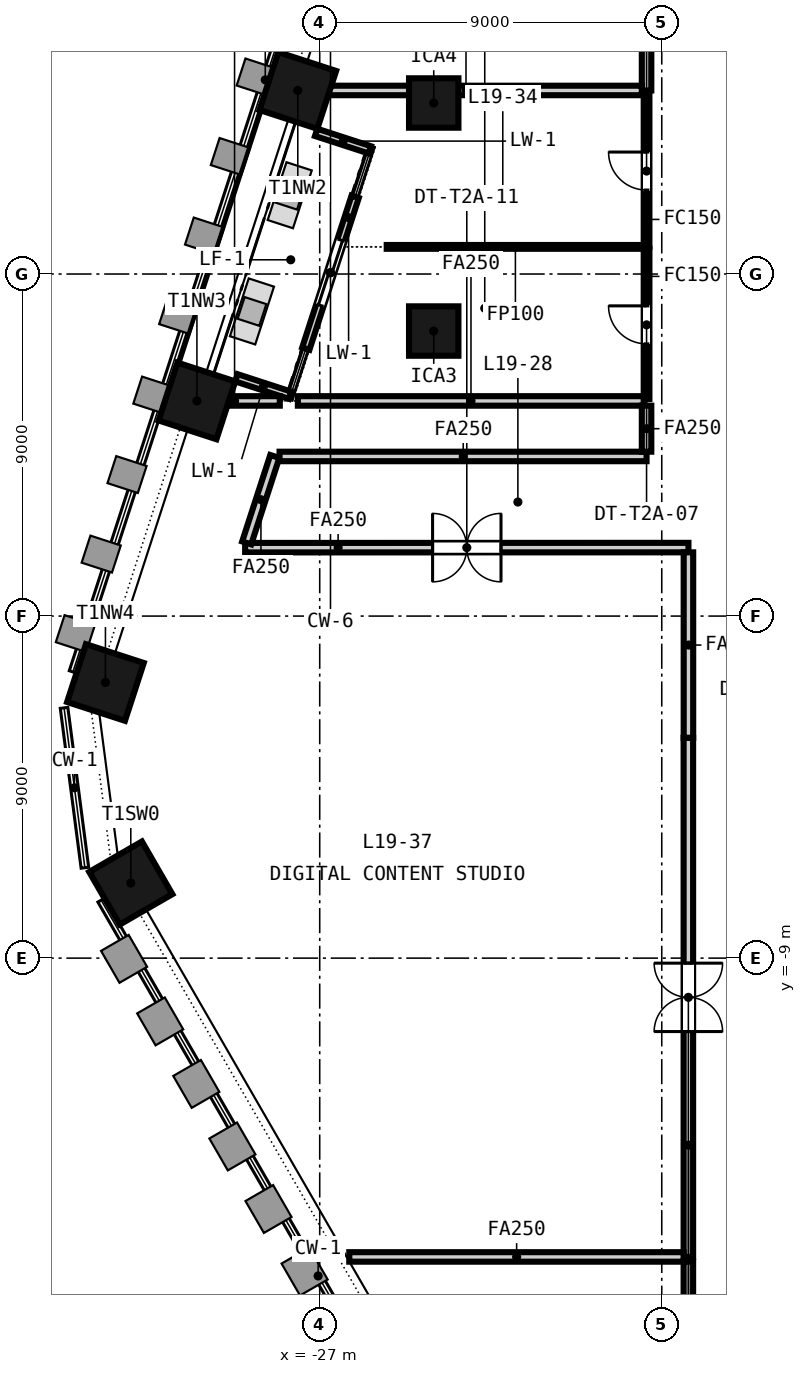
"""IFC4 building model, lengths in metres.
Left out: names, types, materials, properties, quantities, classifications, styles, units other than length and angle.
Written with IfcOpenShell. Run it as: python <this file> out.ifc"""

import sys

from ifc_helpers import new_model, si_unit, direction, frame, frame_2d, origin, origin_2d, place, context, subcontext, project, spatial, rectangle, extrude, element, fill, save


model = new_model("IFC4")
c1 = context("Model", 3, precision=1e-05, world=origin(), true_north=direction((0.0, 1.0)))
c2 = subcontext(c1, "Body", "Model", "MODEL_VIEW")
j1 = project(units=[si_unit("LENGTHUNIT", "METRE"), si_unit("PLANEANGLEUNIT", "RADIAN")], contexts=[c1])
p1 = place(None, origin())
s1 = spatial("IfcSite", under=j1, at=p1, CompositionType="ELEMENT")
p2 = place(p1, origin())
s2 = spatial("IfcBuilding", under=s1, at=p2, CompositionType="ELEMENT")
p3 = place(p2, frame((0.0, 0.0, 84.3)))
s3 = spatial("IfcBuildingStorey", under=s2, at=p3, CompositionType="ELEMENT", Elevation=84.3)
for number, where, z_axis, x_axis in (
    (1, (-27.577, 13.83, -0.15), (0.0, 0.0, 1.0), (-0.309, -0.951, 0.0)),
    (2, (-30.231, 5.661, -0.15), (0.0, 0.0, 1.0), (-0.309, -0.951, 0.0)),
    (3, (-32.638, -1.747, -0.15), (0.0, 0.0, 1.0), (-0.309, -0.951, 0.0)),
    (4, (-31.971, -7.025, -0.15), (0.0, 0.0, 1.0), (0.5, -0.866, 0.0)),
):
    element("IfcColumn", number, at=place(p3, frame(where, z_axis=z_axis, x_axis=x_axis)), inside=s3, PredefinedType="COLUMN", context=c2, shape_type="SweptSolid", body=[
        extrude(rectangle(XDim=1.6, YDim=1.6, at=origin_2d()), origin(), (0.0, 0.0, 1.0), 3.65),
    ])
for number, where, z_axis, x_axis in (
    (5, (-24.0, 7.5, -0.15), (0.0, 0.0, 1.0), (1.0, 0.0, 0.0)),
    (6, (-24.0, 13.5, -0.15), (0.0, 0.0, 1.0), (1.0, 0.0, 0.0)),
):
    element("IfcColumn", number, at=place(p3, frame(where, z_axis=z_axis, x_axis=x_axis)), inside=s3, PredefinedType="COLUMN", context=c2, shape_type="SweptSolid", body=[
        extrude(rectangle(XDim=1.3, YDim=1.3, at=origin_2d()), origin(), (0.0, 0.0, 1.0), 3.65),
    ])
p4 = place(p3, frame((-26.068, 11.032, 0.0), z_axis=(0.0, 0.0, 1.0), x_axis=(-0.30901640812, -0.951056706781, 0.0)))
e7 = element("IfcWall", 7, at=p4, inside=s3, PredefinedType="SOLIDWALL", context=c2, shape_type="SweptSolid", body=[
    extrude(rectangle(XDim=4.2, YDim=0.2, at=frame_2d((2.1, 0.0))), origin(), (0.0, 0.0, 1.0), 2.967),
])
p5 = place(p4, frame((1.2, 0.0, 0.0)))
e8 = element("IfcOpeningElement", 8, at=p5, cuts=e7, PredefinedType="OPENING", context=c2, shape_type="SweptSolid", body=[
    extrude(rectangle(XDim=1.8, YDim=2.4, at=frame_2d((0.9, 1.2))), frame((0.0, 0.11, 0.0), z_axis=(0.0, -1.0, 0.0), x_axis=(1.0, 0.0, 0.0)), (0.0, 0.0, 1.0), 0.22),
])
for number, where, z_axis, x_axis in (
    (9, (-27.094, 12.727, 0.0), (0.0, 0.0, 1.0), (0.951, -0.309, 0.0)),
    (10, (-29.192, 6.27, 0.0), (0.0, 0.0, 1.0), (0.951, -0.309, 0.0)),
):
    element("IfcWall", number, at=place(p3, frame(where, z_axis=z_axis, x_axis=x_axis)), inside=s3, PredefinedType="SOLIDWALL", context=c2, shape_type="SweptSolid", body=[
        extrude(rectangle(XDim=1.484, YDim=0.2, at=frame_2d((0.742, 0.0))), origin(), (0.0, 0.0, 1.0), 3.05),
    ])
p6 = place(p3, frame((-17.298, 1.802, 0.0), z_axis=(0.0, 0.0, 1.0), x_axis=(-0.99999998598, -0.000167451594, 0.0)))
e11 = element("IfcWall", 11, at=p6, inside=s3, PredefinedType="PARTITIONING", context=c2, shape_type="SweptSolid", body=[
    extrude(rectangle(XDim=11.664, YDim=0.25, at=frame_2d((5.832, 0.0))), origin(), (0.0, 0.0, 1.0), 2.741),
])
p7 = place(p6, frame((4.932, 0.0, 0.0)))
e12 = element("IfcOpeningElement", 12, at=p7, cuts=e11, PredefinedType="OPENING", context=c2, shape_type="SweptSolid", body=[
    extrude(rectangle(XDim=1.8, YDim=2.1, at=frame_2d((0.9, 1.05))), frame((0.0, 0.135, 0.0), z_axis=(0.0, -1.0, 0.0), x_axis=(1.0, 0.0, 0.0)), (0.0, 0.0, 1.0), 0.27),
])
p8 = place(p3, frame((-18.4, 13.83, 0.0), z_axis=(0.0, 0.0, 1.0), x_axis=(0.0, 1.0, 0.0)))
e13 = element("IfcWall", 13, at=p8, inside=s3, PredefinedType="PARTITIONING", context=c2, shape_type="SweptSolid", body=[
    extrude(rectangle(XDim=4.97, YDim=0.25, at=frame_2d((2.485, 0.0))), origin(), (0.0, 0.0, 1.0), 2.741),
])
p9 = place(p3, frame((-27.787, 13.83, 0.0), z_axis=(0.0, 0.0, 1.0), x_axis=(1.0, 0.0, 0.0)))
e14 = element("IfcWall", 14, at=p9, inside=s3, PredefinedType="PARTITIONING", context=c2, shape_type="SweptSolid", body=[
    extrude(rectangle(XDim=9.262, YDim=0.25, at=frame_2d((4.631, 0.0))), origin(), (0.0, 0.0, 1.0), 2.741),
])
p10 = place(p3, frame((-18.4, 9.714, 0.0), z_axis=(0.0, 0.0, 1.0), x_axis=(0.0, 1.0, 0.0)))
e15 = element("IfcWall", 15, at=p10, inside=s3, PredefinedType="PARTITIONING", context=c2, shape_type="SweptSolid", body=[
    extrude(rectangle(XDim=3.991, YDim=0.15, at=frame_2d((1.996, 0.0))), origin(), (0.0, 0.0, 1.0), 2.741),
])
p11 = place(p10, frame((1.496, 0.0, 0.0)))
e16 = element("IfcOpeningElement", 16, at=p11, cuts=e15, PredefinedType="OPENING", context=c2, shape_type="SweptSolid", body=[
    extrude(rectangle(XDim=1.0, YDim=2.1, at=frame_2d((0.5, 1.05))), frame((0.0, 0.085, 0.0), z_axis=(0.0, -1.0, 0.0), x_axis=(1.0, 0.0, 0.0)), (0.0, 0.0, 1.0), 0.17),
])
p12 = place(p3, frame((-25.237, 9.714, 0.0), z_axis=(0.0, 0.0, 1.0), x_axis=(1.0, 0.0, 0.0)))
e17 = element("IfcWall", 17, at=p12, inside=s3, PredefinedType="PARTITIONING", context=c2, shape_type="SweptSolid", body=[
    extrude(rectangle(XDim=6.762, YDim=0.1, at=frame_2d((3.381, 0.0))), origin(), (0.0, 0.0, 1.0), 2.741),
])
p13 = place(p3, frame((-18.4, 5.711, 0.0), z_axis=(0.0, 0.0, 1.0), x_axis=(0.0, 1.0, 0.0)))
e18 = element("IfcWall", 18, at=p13, inside=s3, PredefinedType="PARTITIONING", context=c2, shape_type="SweptSolid", body=[
    extrude(rectangle(XDim=3.953, YDim=0.15, at=frame_2d((1.977, 0.0))), origin(), (0.0, 0.0, 1.0), 2.741),
])
p14 = place(p13, frame((1.451, 0.0, 0.0)))
e19 = element("IfcOpeningElement", 19, at=p14, cuts=e18, PredefinedType="OPENING", context=c2, shape_type="SweptSolid", body=[
    extrude(rectangle(XDim=1.0, YDim=2.1, at=frame_2d((0.5, 1.05))), frame((0.0, 0.085, 0.0), z_axis=(0.0, -1.0, 0.0), x_axis=(1.0, 0.0, 0.0)), (0.0, 0.0, 1.0), 0.17),
])
p15 = place(p3, frame((-30.441, 5.661, 0.0), z_axis=(0.0, 0.0, 1.0), x_axis=(1.0, 0.0, 0.0)))
e20 = element("IfcWall", 20, at=p15, inside=s3, PredefinedType="PARTITIONING", context=c2, shape_type="SweptSolid", body=[
    extrude(rectangle(XDim=2.391, YDim=0.25, at=frame_2d((1.195, 0.0))), origin(), (0.0, 0.0, 1.0), 2.741),
])
p16 = place(p3, frame((-27.575, 5.661, 0.0), z_axis=(0.0, 0.0, 1.0), x_axis=(1.0, 0.0, 0.0)))
e21 = element("IfcWall", 21, at=p16, inside=s3, PredefinedType="PARTITIONING", context=c2, shape_type="SweptSolid", body=[
    extrude(rectangle(XDim=9.1, YDim=0.25, at=frame_2d((4.55, 0.0))), origin(), (0.0, 0.0, 1.0), 2.741),
])
p17 = place(p3, frame((-28.921, 1.925, 0.0), z_axis=(0.0, 0.0, 1.0), x_axis=(0.309146074309, 0.951014565998, 0.0)))
e22 = element("IfcWall", 22, at=p17, inside=s3, PredefinedType="PARTITIONING", context=c2, shape_type="SweptSolid", body=[
    extrude(rectangle(XDim=2.392, YDim=0.25, at=frame_2d((1.196, 0.0))), origin(), (0.0, 0.0, 1.0), 2.741),
])
p18 = place(p3, frame((-28.057, 4.2, 0.0), z_axis=(0.0, 0.0, 1.0), x_axis=(1.0, 0.0, 0.0)))
e23 = element("IfcWall", 23, at=p18, inside=s3, PredefinedType="PARTITIONING", context=c2, shape_type="SweptSolid", body=[
    extrude(rectangle(XDim=9.657, YDim=0.25, at=frame_2d((4.829, 0.0))), origin(), (0.0, 0.0, 1.0), 2.741),
])
p19 = place(p3, frame((-18.4, 4.325, 0.0), z_axis=(0.0, 0.0, 1.0), x_axis=(0.0, 1.0, 0.0)))
e24 = element("IfcWall", 24, at=p19, inside=s3, PredefinedType="PARTITIONING", context=c2, shape_type="SweptSolid", body=[
    extrude(rectangle(XDim=1.211, YDim=0.25, at=frame_2d((0.605, 0.0))), origin(), (0.0, 0.0, 1.0), 2.741),
])
p20 = place(p3, frame((-17.3, -16.862, 0.0), z_axis=(0.0, 0.0, 1.0), x_axis=(0.0, 1.0, 0.0)))
e25 = element("IfcWall", 25, at=p20, inside=s3, PredefinedType="PARTITIONING", context=c2, shape_type="SweptSolid", body=[
    extrude(rectangle(XDim=13.66, YDim=0.25, at=frame_2d((6.83, 0.0))), origin(), (0.0, 0.0, 1.0), 2.741),
])
p21 = place(p20, frame((5.93, 0.0, 0.0)))
e26 = element("IfcOpeningElement", 26, at=p21, cuts=e25, PredefinedType="OPENING", context=c2, shape_type="SweptSolid", body=[
    extrude(rectangle(XDim=1.8, YDim=2.1, at=frame_2d((0.9, 1.05))), frame((0.0, 0.135, 0.0), z_axis=(0.0, -1.0, 0.0), x_axis=(1.0, 0.0, 0.0)), (0.0, 0.0, 1.0), 0.27),
])
p22 = place(p3, frame((-17.298, -3.202, 0.0), z_axis=(0.0, 0.0, 1.0), x_axis=(0.0, 1.0, 0.0)))
e27 = element("IfcWall", 27, at=p22, inside=s3, PredefinedType="PARTITIONING", context=c2, shape_type="SweptSolid", body=[
    extrude(rectangle(XDim=4.879, YDim=0.25, at=frame_2d((2.439, 0.0))), origin(), (0.0, 0.0, 1.0), 2.741),
])
p23 = place(p3, frame((-26.222, -16.862, 0.0), z_axis=(0.0, 0.0, 1.0), x_axis=(1.0, 0.0, 0.0)))
e28 = element("IfcWall", 28, at=p23, inside=s3, PredefinedType="PARTITIONING", context=c2, shape_type="SweptSolid", body=[
    extrude(rectangle(XDim=8.797, YDim=0.25, at=frame_2d((4.398, 0.0))), origin(), (0.0, 0.0, 1.0), 2.741),
])
p24 = place(p3, frame((-17.3, -19.075, 0.0), z_axis=(0.0, 0.0, 1.0), x_axis=(0.0, 1.0, 0.0)))
e29 = element("IfcWall", 29, at=p24, inside=s3, PredefinedType="PARTITIONING", context=c2, shape_type="SweptSolid", body=[
    extrude(rectangle(XDim=2.088, YDim=0.25, at=frame_2d((1.044, 0.0))), origin(), (0.0, 0.0, 1.0), 2.741),
])
p25 = place(p5, origin())
e30 = element("IfcDoor", 30, at=p25, inside=s3, OperationType="SINGLE_SWING_LEFT", PredefinedType="DOOR", context=c2, shape_type="SweptSolid", body=[
    extrude(rectangle(XDim=1.8, YDim=2.4, at=frame_2d((0.9, 1.2))), frame((0.0, 0.025, 0.0), z_axis=(0.0, -1.0, 0.0), x_axis=(1.0, 0.0, 0.0)), (0.0, 0.0, 1.0), 0.05),
])
fill(e8, e30)
p26 = place(p11, origin())
e31 = element("IfcDoor", 31, at=p26, inside=s3, OperationType="SINGLE_SWING_RIGHT", PredefinedType="DOOR", context=c2, shape_type="SweptSolid", body=[
    extrude(rectangle(XDim=1.0, YDim=2.1, at=frame_2d((0.5, 1.05))), frame((0.0, 0.025, 0.0), z_axis=(0.0, -1.0, 0.0), x_axis=(1.0, 0.0, 0.0)), (0.0, 0.0, 1.0), 0.05),
])
fill(e16, e31)
p27 = place(p14, origin())
e32 = element("IfcDoor", 32, at=p27, inside=s3, OperationType="SINGLE_SWING_RIGHT", PredefinedType="DOOR", context=c2, shape_type="SweptSolid", body=[
    extrude(rectangle(XDim=1.0, YDim=2.1, at=frame_2d((0.5, 1.05))), frame((0.0, 0.025, 0.0), z_axis=(0.0, -1.0, 0.0), x_axis=(1.0, 0.0, 0.0)), (0.0, 0.0, 1.0), 0.05),
])
fill(e19, e32)
p28 = place(p21, origin())
e33 = element("IfcDoor", 33, at=p28, inside=s3, OperationType="DOUBLE_DOOR_DOUBLE_SWING", PredefinedType="DOOR", context=c2, shape_type="SweptSolid", body=[
    extrude(rectangle(XDim=1.8, YDim=2.1, at=frame_2d((0.9, 1.05))), frame((0.0, 0.025, 0.0), z_axis=(0.0, -1.0, 0.0), x_axis=(1.0, 0.0, 0.0)), (0.0, 0.0, 1.0), 0.05),
])
fill(e26, e33)
p29 = place(p7, origin())
e34 = element("IfcDoor", 34, at=p29, inside=s3, OperationType="DOUBLE_DOOR_DOUBLE_SWING", PredefinedType="DOOR", context=c2, shape_type="SweptSolid", body=[
    extrude(rectangle(XDim=1.8, YDim=2.1, at=frame_2d((0.9, 1.05))), frame((0.0, 0.025, 0.0), z_axis=(0.0, -1.0, 0.0), x_axis=(1.0, 0.0, 0.0)), (0.0, 0.0, 1.0), 0.05),
])
fill(e12, e34)
save(model, sys.argv[1])
